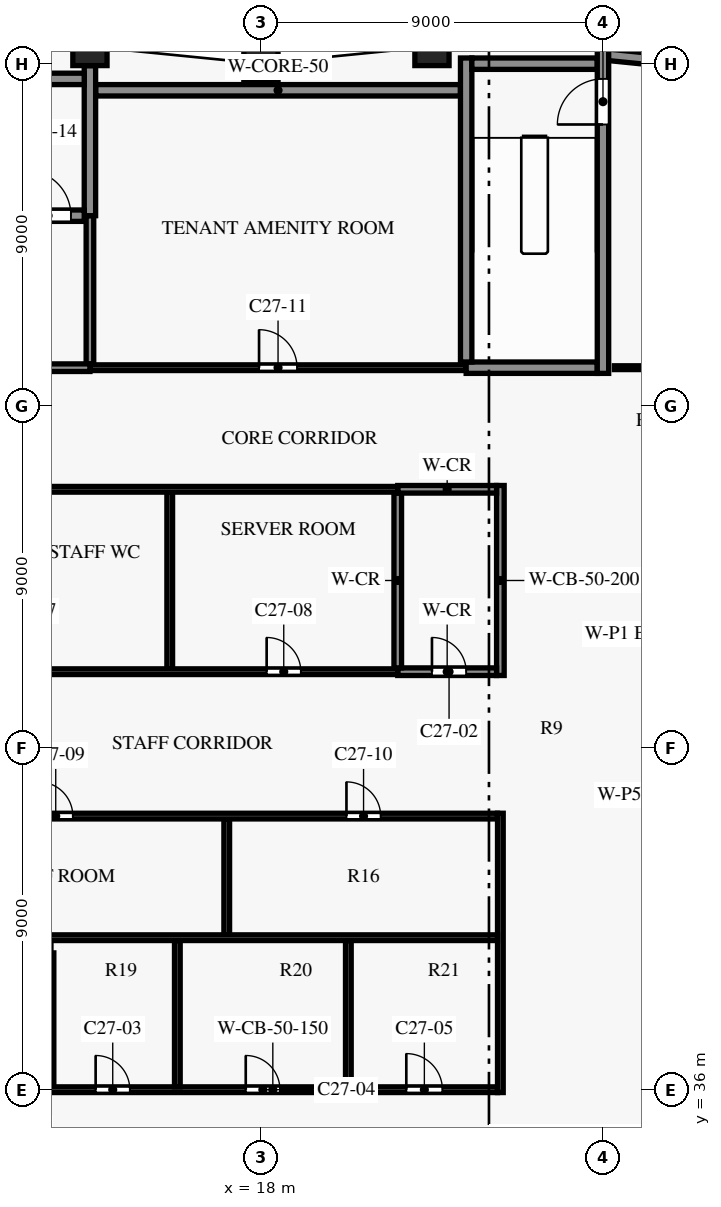
"""IFC4 building model, lengths in metres.
Left out: names, types, materials, properties, quantities, classifications, styles, units other than length and angle.
Written with IfcOpenShell. Run it as: python <this file> out.ifc"""

import sys

from ifc_helpers import new_model, si_unit, direction, frame, frame_2d, origin, origin_2d, place, context, subcontext, project, spatial, rectangle, extrude, element, fill, save


model = new_model("IFC4")
c1 = context("Model", 3, precision=1e-05, world=origin(), true_north=direction((0.0, 1.0)))
c2 = subcontext(c1, "Body", "Model", "MODEL_VIEW")
j1 = project(units=[si_unit("LENGTHUNIT", "METRE"), si_unit("PLANEANGLEUNIT", "RADIAN")], contexts=[c1])
p1 = place(None, origin())
s1 = spatial("IfcSite", under=j1, at=p1, CompositionType="ELEMENT")
p2 = place(p1, origin())
s2 = spatial("IfcBuilding", under=s1, at=p2, CompositionType="ELEMENT")
p3 = place(p2, frame((0.0, 0.0, 198.8)))
s3 = spatial("IfcBuildingStorey", under=s2, at=p3, CompositionType="ELEMENT", Elevation=198.8)
for number, where, z_axis, x_axis in (
    (1, (22.5, 63.45, 0.0), (0.0, 0.0, 1.0), (-0.995, -0.1, 0.0)),
    (2, (18.0, 63.0, 0.0), (0.0, 0.0, 1.0), (-1.0, 0.0, 0.0)),
    (3, (13.5, 63.45, 0.0), (0.0, 0.0, 1.0), (-0.995, 0.1, 0.0)),
):
    element("IfcColumn", number, at=place(p3, frame(where, z_axis=z_axis, x_axis=x_axis)), inside=s3, PredefinedType="COLUMN", context=c2, shape_type="SweptSolid", body=[
        extrude(rectangle(XDim=0.9, YDim=1.0, at=origin_2d()), origin(), (0.0, 0.0, 1.0), 3.8),
    ])
p4 = place(p3, frame((27.085, 63.238, 0.0), z_axis=(0.0, 0.0, 1.0), x_axis=(0.995035836657, -0.099517253618, 0.0)))
e4 = element("IfcWall", 4, at=p4, inside=s3, PredefinedType="SOLIDWALL", context=c2, shape_type="SweptSolid", body=[
    extrude(rectangle(XDim=8.93, YDim=0.3, at=frame_2d((4.465, 0.0))), origin(), (0.0, 0.0, 1.0), 3.15),
])
p5 = place(p4, frame((1.211, 0.0, 0.75)))
e5 = element("IfcOpeningElement", 5, at=p5, cuts=e4, PredefinedType="OPENING", context=c2, shape_type="SweptSolid", body=[
    extrude(rectangle(XDim=1.8, YDim=1.8, at=frame_2d((0.9, 0.9))), frame((0.0, 0.16, 0.0), z_axis=(0.0, -1.0, 0.0), x_axis=(1.0, 0.0, 0.0)), (0.0, 0.0, 1.0), 0.32),
])
p6 = place(p4, frame((4.984, 0.0, 0.15)))
e6 = element("IfcOpeningElement", 6, at=p6, cuts=e4, PredefinedType="OPENING", context=c2, shape_type="SweptSolid", body=[
    extrude(rectangle(XDim=3.3, YDim=2.4, at=frame_2d((1.65, 1.2))), frame((0.0, 0.16, 0.0), z_axis=(0.0, -1.0, 0.0), x_axis=(1.0, 0.0, 0.0)), (0.0, 0.0, 1.0), 0.32),
])
p7 = place(p3, frame((12.4, 36.0, 0.0), z_axis=(0.0, 0.0, 1.0), x_axis=(1.0, 0.0, 0.0)))
e7 = element("IfcWall", 7, at=p7, inside=s3, PredefinedType="SHEAR", context=c2, shape_type="SweptSolid", body=[
    extrude(rectangle(XDim=11.825, YDim=0.15, at=frame_2d((5.913, 0.0))), origin(), (0.0, 0.0, 1.0), 3.5),
])
p8 = place(p7, frame((1.25, 0.0, 0.0)))
e8 = element("IfcOpeningElement", 8, at=p8, cuts=e7, PredefinedType="OPENING", context=c2, shape_type="SweptSolid", body=[
    extrude(rectangle(XDim=0.9, YDim=2.1, at=frame_2d((0.45, 1.05))), frame((0.0, 0.085, 0.0), z_axis=(0.0, -1.0, 0.0), x_axis=(1.0, 0.0, 0.0)), (0.0, 0.0, 1.0), 0.17),
])
p9 = place(p7, frame((5.2, 0.0, 0.0)))
e9 = element("IfcOpeningElement", 9, at=p9, cuts=e7, PredefinedType="OPENING", context=c2, shape_type="SweptSolid", body=[
    extrude(rectangle(XDim=0.9, YDim=2.1, at=frame_2d((0.45, 1.05))), frame((0.0, 0.085, 0.0), z_axis=(0.0, -1.0, 0.0), x_axis=(1.0, 0.0, 0.0)), (0.0, 0.0, 1.0), 0.17),
])
p10 = place(p7, frame((9.425, 0.0, 0.0)))
e10 = element("IfcOpeningElement", 10, at=p10, cuts=e7, PredefinedType="OPENING", context=c2, shape_type="SweptSolid", body=[
    extrude(rectangle(XDim=0.95, YDim=2.1, at=frame_2d((0.475, 1.05))), frame((0.0, 0.085, 0.0), z_axis=(0.0, -1.0, 0.0), x_axis=(1.0, 0.0, 0.0)), (0.0, 0.0, 1.0), 0.17),
])
p11 = place(p3, frame((8.1, 40.0, 0.0), z_axis=(0.0, 0.0, 1.0), x_axis=(1.0, 0.0, 0.0)))
e11 = element("IfcWall", 11, at=p11, inside=s3, PredefinedType="PARTITIONING", context=c2, shape_type="SweptSolid", body=[
    extrude(rectangle(XDim=16.125, YDim=0.15, at=frame_2d((8.062, 0.0))), origin(), (0.0, 0.0, 1.0), 3.5),
])
p12 = place(p3, frame((8.1, 43.2, 0.0), z_axis=(0.0, 0.0, 1.0), x_axis=(1.0, 0.0, 0.0)))
e12 = element("IfcWall", 12, at=p12, inside=s3, PredefinedType="PARTITIONING", context=c2, shape_type="SweptSolid", body=[
    extrude(rectangle(XDim=16.125, YDim=0.15, at=frame_2d((8.062, 0.0))), origin(), (0.0, 0.0, 1.0), 3.5),
])
p13 = place(p12, frame((4.05, 0.0, 0.0)))
e13 = element("IfcOpeningElement", 13, at=p13, cuts=e12, PredefinedType="OPENING", context=c2, shape_type="SweptSolid", body=[
    extrude(rectangle(XDim=0.9, YDim=2.1, at=frame_2d((0.45, 1.05))), frame((0.0, 0.085, 0.0), z_axis=(0.0, -1.0, 0.0), x_axis=(1.0, 0.0, 0.0)), (0.0, 0.0, 1.0), 0.17),
])
p14 = place(p12, frame((12.15, 0.0, 0.0)))
e14 = element("IfcOpeningElement", 14, at=p14, cuts=e12, PredefinedType="OPENING", context=c2, shape_type="SweptSolid", body=[
    extrude(rectangle(XDim=0.9, YDim=2.1, at=frame_2d((0.45, 1.05))), frame((0.0, 0.085, 0.0), z_axis=(0.0, -1.0, 0.0), x_axis=(1.0, 0.0, 0.0)), (0.0, 0.0, 1.0), 0.17),
])
p15 = place(p3, frame((8.1, 47.0, 0.0), z_axis=(0.0, 0.0, 1.0), x_axis=(1.0, 0.0, 0.0)))
e15 = element("IfcWall", 15, at=p15, inside=s3, PredefinedType="PARTITIONING", context=c2, shape_type="SweptSolid", body=[
    extrude(rectangle(XDim=13.5, YDim=0.15, at=frame_2d((6.75, 0.0))), origin(), (0.0, 0.0, 1.0), 3.5),
])
p16 = place(p15, frame((3.3, 0.0, 0.0)))
e16 = element("IfcOpeningElement", 16, at=p16, cuts=e15, PredefinedType="OPENING", context=c2, shape_type="SweptSolid", body=[
    extrude(rectangle(XDim=0.9, YDim=2.1, at=frame_2d((0.45, 1.05))), frame((0.0, 0.085, 0.0), z_axis=(0.0, -1.0, 0.0), x_axis=(1.0, 0.0, 0.0)), (0.0, 0.0, 1.0), 0.17),
])
p17 = place(p15, frame((10.05, 0.0, 0.0)))
e17 = element("IfcOpeningElement", 17, at=p17, cuts=e15, PredefinedType="OPENING", context=c2, shape_type="SweptSolid", body=[
    extrude(rectangle(XDim=0.9, YDim=2.1, at=frame_2d((0.45, 1.05))), frame((0.0, 0.085, 0.0), z_axis=(0.0, -1.0, 0.0), x_axis=(1.0, 0.0, 0.0)), (0.0, 0.0, 1.0), 0.17),
])
p18 = place(p3, frame((21.6, 47.0, 0.0), z_axis=(0.0, 0.0, 1.0), x_axis=(1.0, 0.0, 0.0)))
e18 = element("IfcWall", 18, at=p18, inside=s3, PredefinedType="PARTITIONING", context=c2, shape_type="SweptSolid", body=[
    extrude(rectangle(XDim=2.6, YDim=0.2, at=frame_2d((1.3, 0.0))), origin(), (0.0, 0.0, 1.0), 3.5),
])
p19 = place(p18, frame((0.9, 0.0, 0.0)))
e19 = element("IfcOpeningElement", 19, at=p19, cuts=e18, PredefinedType="OPENING", context=c2, shape_type="SweptSolid", body=[
    extrude(rectangle(XDim=0.9, YDim=2.1, at=frame_2d((0.45, 1.05))), frame((0.0, 0.11, 0.0), z_axis=(0.0, -1.0, 0.0), x_axis=(1.0, 0.0, 0.0)), (0.0, 0.0, 1.0), 0.22),
])
p20 = place(p3, frame((8.225, 51.8, 0.0), z_axis=(0.0, 0.0, 1.0), x_axis=(1.0, 0.0, 0.0)))
e20 = element("IfcWall", 20, at=p20, inside=s3, PredefinedType="PARTITIONING", context=c2, shape_type="SweptSolid", body=[
    extrude(rectangle(XDim=13.375, YDim=0.15, at=frame_2d((6.688, 0.0))), origin(), (0.0, 0.0, 1.0), 3.5),
])
p21 = place(p3, frame((21.6, 51.8, 0.0), z_axis=(0.0, 0.0, 1.0), x_axis=(1.0, 0.0, 0.0)))
e21 = element("IfcWall", 21, at=p21, inside=s3, PredefinedType="PARTITIONING", context=c2, shape_type="SweptSolid", body=[
    extrude(rectangle(XDim=2.6, YDim=0.2, at=frame_2d((1.3, 0.0))), origin(), (0.0, 0.0, 1.0), 3.5),
])
p22 = place(p3, frame((8.1, 55.0, 0.0), z_axis=(0.0, 0.0, 1.0), x_axis=(1.0, 0.0, 0.0)))
e22 = element("IfcWall", 22, at=p22, inside=s3, PredefinedType="PARTITIONING", context=c2, shape_type="SweptSolid", body=[
    extrude(rectangle(XDim=5.4, YDim=0.2, at=frame_2d((2.7, 0.0))), origin(), (0.0, 0.0, 1.0), 3.5),
])
p23 = place(p22, frame((2.1, 0.0, 0.0)))
e23 = element("IfcOpeningElement", 23, at=p23, cuts=e22, PredefinedType="OPENING", context=c2, shape_type="SweptSolid", body=[
    extrude(rectangle(XDim=1.2, YDim=2.2, at=frame_2d((0.6, 1.1))), frame((0.0, 0.11, 0.0), z_axis=(0.0, -1.0, 0.0), x_axis=(1.0, 0.0, 0.0)), (0.0, 0.0, 1.0), 0.22),
])
p24 = place(p3, frame((13.5, 55.0, 0.0), z_axis=(0.0, 0.0, 1.0), x_axis=(1.0, 0.0, 0.0)))
e24 = element("IfcWall", 24, at=p24, inside=s3, PredefinedType="PARTITIONING", context=c2, shape_type="SweptSolid", body=[
    extrude(rectangle(XDim=9.9, YDim=0.15, at=frame_2d((4.95, 0.0))), origin(), (0.0, 0.0, 1.0), 3.5),
])
p25 = place(p24, frame((4.45, 0.0, 0.0)))
e25 = element("IfcOpeningElement", 25, at=p25, cuts=e24, PredefinedType="OPENING", context=c2, shape_type="SweptSolid", body=[
    extrude(rectangle(XDim=1.0, YDim=2.1, at=frame_2d((0.5, 1.05))), frame((0.0, 0.085, 0.0), z_axis=(0.0, -1.0, 0.0), x_axis=(1.0, 0.0, 0.0)), (0.0, 0.0, 1.0), 0.17),
])
p26 = place(p3, frame((23.4, 55.0, 0.0), z_axis=(0.0, 0.0, 1.0), x_axis=(1.0, 0.0, 0.0)))
e26 = element("IfcWall", 26, at=p26, inside=s3, PredefinedType="SHEAR", context=c2, shape_type="SweptSolid", body=[
    extrude(rectangle(XDim=3.45, YDim=0.3, at=frame_2d((1.725, 0.0))), origin(), (0.0, 0.0, 1.0), 3.5),
])
p27 = place(p3, frame((5.0, 59.0, 0.0), z_axis=(0.0, 0.0, 1.0), x_axis=(1.0, 0.0, 0.0)))
e27 = element("IfcWall", 27, at=p27, inside=s3, PredefinedType="SHEAR", context=c2, shape_type="SweptSolid", body=[
    extrude(rectangle(XDim=8.35, YDim=0.3, at=frame_2d((4.175, 0.0))), origin(), (0.0, 0.0, 1.0), 3.5),
])
p28 = place(p27, frame((6.8, 0.0, 0.0)))
e28 = element("IfcOpeningElement", 28, at=p28, cuts=e27, PredefinedType="OPENING", context=c2, shape_type="SweptSolid", body=[
    extrude(rectangle(XDim=1.2, YDim=2.2, at=frame_2d((0.6, 1.1))), frame((0.0, 0.16, 0.0), z_axis=(0.0, -1.0, 0.0), x_axis=(1.0, 0.0, 0.0)), (0.0, 0.0, 1.0), 0.32),
])
p29 = place(p3, frame((13.65, 62.3, 0.0), z_axis=(0.0, 0.0, 1.0), x_axis=(1.0, 0.0, 0.0)))
e29 = element("IfcWall", 29, at=p29, inside=s3, PredefinedType="SHEAR", context=c2, shape_type="SweptSolid", body=[
    extrude(rectangle(XDim=9.6, YDim=0.3, at=frame_2d((4.8, 0.0))), origin(), (0.0, 0.0, 1.0), 3.5),
])
p30 = place(p3, frame((5.65, 62.6, 0.0), z_axis=(0.0, 0.0, 1.0), x_axis=(1.0, 0.0, 0.0)))
e30 = element("IfcWall", 30, at=p30, inside=s3, PredefinedType="SHEAR", context=c2, shape_type="SweptSolid", body=[
    extrude(rectangle(XDim=7.7, YDim=0.3, at=frame_2d((3.85, 0.0))), origin(), (0.0, 0.0, 1.0), 3.5),
])
p31 = place(p3, frame((23.55, 63.0, 0.0), z_axis=(0.0, 0.0, 1.0), x_axis=(1.0, 0.0, 0.0)))
e31 = element("IfcWall", 31, at=p31, inside=s3, PredefinedType="SHEAR", context=c2, shape_type="SweptSolid", body=[
    extrude(rectangle(XDim=3.3, YDim=0.3, at=frame_2d((1.65, 0.0))), origin(), (0.0, 0.0, 1.0), 3.5),
])
p32 = place(p3, frame((12.4, 36.15, 0.0), z_axis=(0.0, 0.0, 1.0), x_axis=(0.0, 1.0, 0.0)))
e32 = element("IfcWall", 32, at=p32, inside=s3, PredefinedType="SHEAR", context=c2, shape_type="SweptSolid", body=[
    extrude(rectangle(XDim=3.45, YDim=0.3, at=frame_2d((1.725, 0.0))), origin(), (0.0, 0.0, 1.0), 3.5),
])
p33 = place(p3, frame((13.5, 55.1, 0.0), z_axis=(0.0, 0.0, 1.0), x_axis=(0.0, 1.0, 0.0)))
e33 = element("IfcWall", 33, at=p33, inside=s3, PredefinedType="PARTITIONING", context=c2, shape_type="SweptSolid", body=[
    extrude(rectangle(XDim=3.9, YDim=0.2, at=frame_2d((1.95, 0.0))), origin(), (0.0, 0.0, 1.0), 3.5),
])
p34 = place(p3, frame((13.5, 59.0, 0.0), z_axis=(0.0, 0.0, 1.0), x_axis=(0.0, 1.0, 0.0)))
e34 = element("IfcWall", 34, at=p34, inside=s3, PredefinedType="SHEAR", context=c2, shape_type="SweptSolid", body=[
    extrude(rectangle(XDim=3.948, YDim=0.3, at=frame_2d((1.974, 0.0))), origin(), (0.0, 0.0, 1.0), 3.5),
])
p35 = place(p3, frame((15.6, 47.075, 0.0), z_axis=(0.0, 0.0, 1.0), x_axis=(0.0, 1.0, 0.0)))
e35 = element("IfcWall", 35, at=p35, inside=s3, PredefinedType="PARTITIONING", context=c2, shape_type="SweptSolid", body=[
    extrude(rectangle(XDim=4.65, YDim=0.15, at=frame_2d((2.325, 0.0))), origin(), (0.0, 0.0, 1.0), 3.5),
])
p36 = place(p3, frame((15.8, 36.075, 0.0), z_axis=(0.0, 0.0, 1.0), x_axis=(0.0, 1.0, 0.0)))
e36 = element("IfcWall", 36, at=p36, inside=s3, PredefinedType="PARTITIONING", context=c2, shape_type="SweptSolid", body=[
    extrude(rectangle(XDim=3.85, YDim=0.15, at=frame_2d((1.925, 0.0))), origin(), (0.0, 0.0, 1.0), 3.5),
])
p37 = place(p3, frame((17.1, 40.075, 0.0), z_axis=(0.0, 0.0, 1.0), x_axis=(0.0, 1.0, 0.0)))
e37 = element("IfcWall", 37, at=p37, inside=s3, PredefinedType="PARTITIONING", context=c2, shape_type="SweptSolid", body=[
    extrude(rectangle(XDim=3.05, YDim=0.15, at=frame_2d((1.525, 0.0))), origin(), (0.0, 0.0, 1.0), 3.5),
])
p38 = place(p3, frame((20.3, 36.075, 0.0), z_axis=(0.0, 0.0, 1.0), x_axis=(0.0, 1.0, 0.0)))
e38 = element("IfcWall", 38, at=p38, inside=s3, PredefinedType="PARTITIONING", context=c2, shape_type="SweptSolid", body=[
    extrude(rectangle(XDim=3.85, YDim=0.15, at=frame_2d((1.925, 0.0))), origin(), (0.0, 0.0, 1.0), 3.5),
])
p39 = place(p3, frame((21.6, 47.1, 0.0), z_axis=(0.0, 0.0, 1.0), x_axis=(0.0, 1.0, 0.0)))
e39 = element("IfcWall", 39, at=p39, inside=s3, PredefinedType="PARTITIONING", context=c2, shape_type="SweptSolid", body=[
    extrude(rectangle(XDim=4.6, YDim=0.2, at=frame_2d((2.3, 0.0))), origin(), (0.0, 0.0, 1.0), 3.5),
])
p40 = place(p3, frame((23.4, 55.15, 0.0), z_axis=(0.0, 0.0, 1.0), x_axis=(0.0, 1.0, 0.0)))
e40 = element("IfcWall", 40, at=p40, inside=s3, PredefinedType="SHEAR", context=c2, shape_type="SweptSolid", body=[
    extrude(rectangle(XDim=8.0, YDim=0.3, at=frame_2d((4.0, 0.0))), origin(), (0.0, 0.0, 1.0), 3.5),
])
p41 = place(p3, frame((24.3, 35.925, 0.0), z_axis=(0.0, 0.0, 1.0), x_axis=(0.0, 1.0, 0.0)))
e41 = element("IfcWall", 41, at=p41, inside=s3, PredefinedType="PARTITIONING", context=c2, shape_type="SweptSolid", body=[
    extrude(rectangle(XDim=7.35, YDim=0.15, at=frame_2d((3.675, 0.0))), origin(), (0.0, 0.0, 1.0), 3.5),
])
p42 = place(p3, frame((24.3, 46.9, 0.0), z_axis=(0.0, 0.0, 1.0), x_axis=(0.0, 1.0, 0.0)))
e42 = element("IfcWall", 42, at=p42, inside=s3, PredefinedType="SHEAR", context=c2, shape_type="SweptSolid", body=[
    extrude(rectangle(XDim=5.0, YDim=0.2, at=frame_2d((2.5, 0.0))), origin(), (0.0, 0.0, 1.0), 3.5),
])
p43 = place(p3, frame((27.0, 54.85, 0.0), z_axis=(0.0, 0.0, 1.0), x_axis=(0.0, 1.0, 0.0)))
e43 = element("IfcWall", 43, at=p43, inside=s3, PredefinedType="SHEAR", context=c2, shape_type="SweptSolid", body=[
    extrude(rectangle(XDim=8.55, YDim=0.3, at=frame_2d((4.275, 0.0))), origin(), (0.0, 0.0, 1.0), 3.5),
])
p44 = place(p43, frame((6.55, 0.0, 0.0)))
e44 = element("IfcOpeningElement", 44, at=p44, cuts=e43, PredefinedType="OPENING", context=c2, shape_type="SweptSolid", body=[
    extrude(rectangle(XDim=1.2, YDim=2.2, at=frame_2d((0.6, 1.1))), frame((0.0, 0.16, 0.0), z_axis=(0.0, -1.0, 0.0), x_axis=(1.0, 0.0, 0.0)), (0.0, 0.0, 1.0), 0.32),
])
p45 = place(p3, frame((27.3, 55.0, 0.0), z_axis=(0.0, 0.0, 1.0), x_axis=(1.0, 0.0, 0.0)))
e45 = element("IfcWall", 45, at=p45, inside=s3, PredefinedType="PARTITIONING", context=c2, shape_type="SweptSolid", body=[
    extrude(rectangle(XDim=2.75, YDim=0.1, at=frame_2d((1.375, 0.0))), origin(), (0.0, 0.0, 1.0), 3.48),
])
p46 = place(p19, origin())
e46 = element("IfcDoor", 46, at=p46, inside=s3, OperationType="SINGLE_SWING_LEFT", PredefinedType="DOOR", context=c2, shape_type="SweptSolid", body=[
    extrude(rectangle(XDim=0.9, YDim=2.1, at=frame_2d((0.45, 1.05))), frame((0.0, 0.025, 0.0), z_axis=(0.0, -1.0, 0.0), x_axis=(1.0, 0.0, 0.0)), (0.0, 0.0, 1.0), 0.05),
])
fill(e19, e46)
p47 = place(p8, origin())
e47 = element("IfcDoor", 47, at=p47, inside=s3, OperationType="SINGLE_SWING_RIGHT", PredefinedType="DOOR", context=c2, shape_type="SweptSolid", body=[
    extrude(rectangle(XDim=0.9, YDim=2.1, at=frame_2d((0.45, 1.05))), frame((0.0, 0.025, 0.0), z_axis=(0.0, -1.0, 0.0), x_axis=(1.0, 0.0, 0.0)), (0.0, 0.0, 1.0), 0.05),
])
fill(e8, e47)
p48 = place(p9, origin())
e48 = element("IfcDoor", 48, at=p48, inside=s3, OperationType="SINGLE_SWING_LEFT", PredefinedType="DOOR", context=c2, shape_type="SweptSolid", body=[
    extrude(rectangle(XDim=0.9, YDim=2.1, at=frame_2d((0.45, 1.05))), frame((0.0, 0.025, 0.0), z_axis=(0.0, -1.0, 0.0), x_axis=(1.0, 0.0, 0.0)), (0.0, 0.0, 1.0), 0.05),
])
fill(e9, e48)
p49 = place(p10, origin())
e49 = element("IfcDoor", 49, at=p49, inside=s3, OperationType="SINGLE_SWING_RIGHT", PredefinedType="DOOR", context=c2, shape_type="SweptSolid", body=[
    extrude(rectangle(XDim=0.95, YDim=2.1, at=frame_2d((0.475, 1.05))), frame((0.0, 0.025, 0.0), z_axis=(0.0, -1.0, 0.0), x_axis=(1.0, 0.0, 0.0)), (0.0, 0.0, 1.0), 0.05),
])
fill(e10, e49)
p50 = place(p17, origin())
e50 = element("IfcDoor", 50, at=p50, inside=s3, OperationType="SINGLE_SWING_RIGHT", PredefinedType="DOOR", context=c2, shape_type="SweptSolid", body=[
    extrude(rectangle(XDim=0.9, YDim=2.1, at=frame_2d((0.45, 1.05))), frame((0.0, 0.025, 0.0), z_axis=(0.0, -1.0, 0.0), x_axis=(1.0, 0.0, 0.0)), (0.0, 0.0, 1.0), 0.05),
])
fill(e17, e50)
p51 = place(p13, origin())
e51 = element("IfcDoor", 51, at=p51, inside=s3, OperationType="SINGLE_SWING_RIGHT", PredefinedType="DOOR", context=c2, shape_type="SweptSolid", body=[
    extrude(rectangle(XDim=0.9, YDim=2.1, at=frame_2d((0.45, 1.05))), frame((0.0, 0.025, 0.0), z_axis=(0.0, -1.0, 0.0), x_axis=(1.0, 0.0, 0.0)), (0.0, 0.0, 1.0), 0.05),
])
fill(e13, e51)
p52 = place(p14, origin())
e52 = element("IfcDoor", 52, at=p52, inside=s3, OperationType="SINGLE_SWING_LEFT", PredefinedType="DOOR", context=c2, shape_type="SweptSolid", body=[
    extrude(rectangle(XDim=0.9, YDim=2.1, at=frame_2d((0.45, 1.05))), frame((0.0, 0.025, 0.0), z_axis=(0.0, -1.0, 0.0), x_axis=(1.0, 0.0, 0.0)), (0.0, 0.0, 1.0), 0.05),
])
fill(e14, e52)
p53 = place(p25, origin())
e53 = element("IfcDoor", 53, at=p53, inside=s3, OperationType="SINGLE_SWING_LEFT", PredefinedType="DOOR", context=c2, shape_type="SweptSolid", body=[
    extrude(rectangle(XDim=1.0, YDim=2.1, at=frame_2d((0.5, 1.05))), frame((0.0, 0.025, 0.0), z_axis=(0.0, -1.0, 0.0), x_axis=(1.0, 0.0, 0.0)), (0.0, 0.0, 1.0), 0.05),
])
fill(e25, e53)
p54 = place(p44, origin())
e54 = element("IfcDoor", 54, at=p54, inside=s3, OperationType="SINGLE_SWING_LEFT", PredefinedType="DOOR", context=c2, shape_type="SweptSolid", body=[
    extrude(rectangle(XDim=1.2, YDim=2.2, at=frame_2d((0.6, 1.1))), frame((0.0, 0.025, 0.0), z_axis=(0.0, -1.0, 0.0), x_axis=(1.0, 0.0, 0.0)), (0.0, 0.0, 1.0), 0.05),
])
fill(e44, e54)
p55 = place(p28, origin())
e55 = element("IfcDoor", 55, at=p55, inside=s3, OperationType="SINGLE_SWING_RIGHT", PredefinedType="DOOR", context=c2, shape_type="SweptSolid", body=[
    extrude(rectangle(XDim=1.2, YDim=2.2, at=frame_2d((0.6, 1.1))), frame((0.0, 0.025, 0.0), z_axis=(0.0, -1.0, 0.0), x_axis=(1.0, 0.0, 0.0)), (0.0, 0.0, 1.0), 0.05),
])
fill(e28, e55)
save(model, sys.argv[1])
